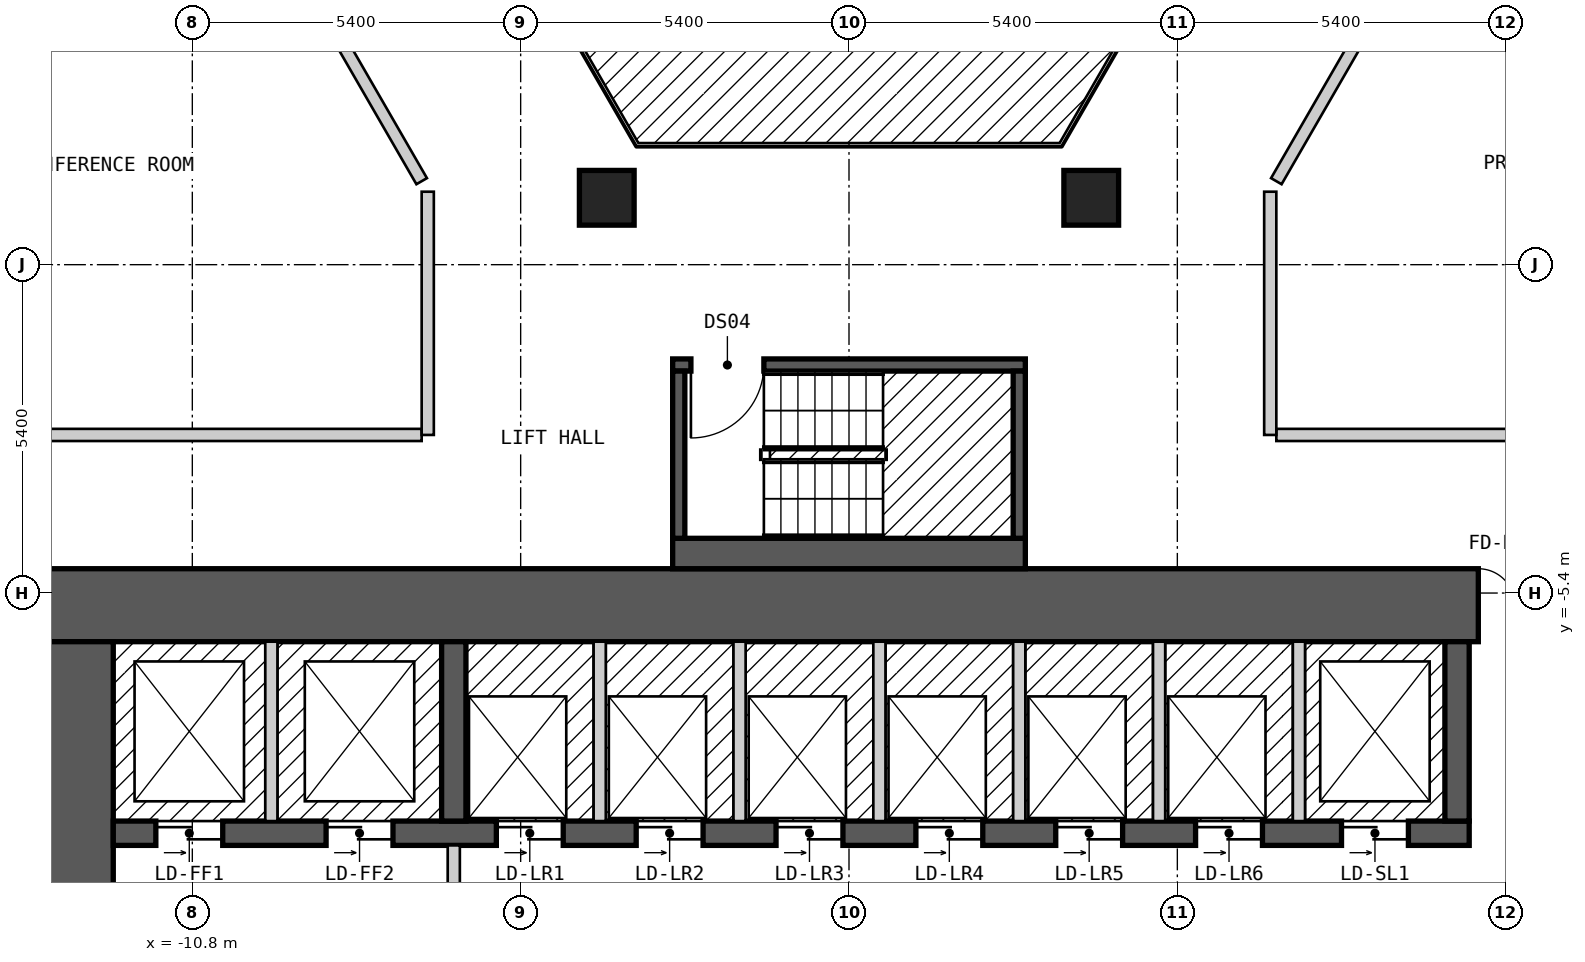
"""IFC4 building model, lengths in metres.
Left out: names, types, materials, properties, quantities, classifications, styles, units other than length and angle.
Written with IfcOpenShell. Run it as: python <this file> out.ifc"""

import sys

from ifc_helpers import new_model, si_unit, direction, frame, frame_2d, origin, origin_2d, place, context, subcontext, project, spatial, rectangle, extrude, element, fill, save


model = new_model("IFC4")
c1 = context("Model", 3, precision=1e-05, world=origin(), true_north=direction((0.0, 1.0)))
c2 = subcontext(c1, "Body", "Model", "MODEL_VIEW")
j1 = project(units=[si_unit("LENGTHUNIT", "METRE"), si_unit("PLANEANGLEUNIT", "RADIAN")], contexts=[c1])
p1 = place(None, origin())
s1 = spatial("IfcSite", under=j1, at=p1, CompositionType="ELEMENT")
p2 = place(p1, origin())
s2 = spatial("IfcBuilding", under=s1, at=p2, CompositionType="ELEMENT")
p3 = place(p2, frame((0.0, 0.0, 50.4)))
s3 = spatial("IfcBuildingStorey", under=s2, at=p3, CompositionType="ELEMENT", Elevation=50.4)
for number, where, z_axis, x_axis in (
    (1, (3.984, 1.1, 0.0), (0.0, 0.0, 1.0), (1.0, 0.0, 0.0)),
    (2, (-3.984, 1.1, 0.0), (0.0, 0.0, 1.0), (1.0, 0.0, 0.0)),
):
    element("IfcColumn", number, at=place(p3, frame(where, z_axis=z_axis, x_axis=x_axis)), inside=s3, PredefinedType="COLUMN", context=c2, shape_type="SweptSolid", body=[
        extrude(rectangle(XDim=0.9, YDim=0.9, at=origin_2d()), origin(), (0.0, 0.0, 1.0), 3.0),
    ])
p4 = place(p3, frame((-13.3, -5.6, 0.0), z_axis=(0.0, 0.0, 1.0), x_axis=(1.0, 0.0, 0.0)))
e3 = element("IfcWall", 3, at=p4, inside=s3, PredefinedType="SHEAR", context=c2, shape_type="SweptSolid", body=[
    extrude(rectangle(XDim=26.6, YDim=1.2, at=frame_2d((13.3, 0.0))), origin(), (0.0, 0.0, 1.0), 2.7),
])
p5 = place(p4, frame((23.65, 0.0, 0.0)))
e4 = element("IfcOpeningElement", 4, at=p5, cuts=e3, PredefinedType="OPENING", context=c2, shape_type="SweptSolid", body=[
    extrude(rectangle(XDim=1.2, YDim=2.1, at=frame_2d((0.6, 1.05))), frame((0.0, 0.61, 0.0), z_axis=(0.0, -1.0, 0.0), x_axis=(1.0, 0.0, 0.0)), (0.0, 0.0, 1.0), 1.22),
])
p6 = place(p3, frame((-12.7, -17.8, 0.0), z_axis=(0.0, 0.0, 1.0), x_axis=(0.0, 1.0, 0.0)))
e5 = element("IfcWall", 5, at=p6, inside=s3, PredefinedType="SHEAR", context=c2, shape_type="SweptSolid", body=[
    extrude(rectangle(XDim=11.6, YDim=1.2, at=frame_2d((5.8, 0.0))), origin(), (0.0, 0.0, 1.0), 2.7),
])
p7 = place(p6, frame((3.6, 0.0, 0.0)))
e6 = element("IfcOpeningElement", 6, at=p7, cuts=e5, PredefinedType="OPENING", context=c2, shape_type="SweptSolid", body=[
    extrude(rectangle(XDim=1.2, YDim=2.1, at=frame_2d((0.6, 1.05))), frame((0.0, 0.61, 0.0), z_axis=(0.0, -1.0, 0.0), x_axis=(1.0, 0.0, 0.0)), (0.0, 0.0, 1.0), 1.22),
])
p8 = place(p3, frame((-12.1, -9.35, 0.0), z_axis=(0.0, 0.0, 1.0), x_axis=(1.0, 0.0, 0.0)))
e7 = element("IfcWall", 7, at=p8, inside=s3, PredefinedType="SHEAR", context=c2, shape_type="SweptSolid", body=[
    extrude(rectangle(XDim=22.3, YDim=0.4, at=frame_2d((11.15, 0.0))), origin(), (0.0, 0.0, 1.0), 2.7),
])
p9 = place(p8, frame((0.7, 0.0, 0.0)))
e8 = element("IfcOpeningElement", 8, at=p9, cuts=e7, PredefinedType="OPENING", context=c2, shape_type="SweptSolid", body=[
    extrude(rectangle(XDim=1.1, YDim=2.1, at=frame_2d((0.55, 1.05))), frame((0.0, 0.21, 0.0), z_axis=(0.0, -1.0, 0.0), x_axis=(1.0, 0.0, 0.0)), (0.0, 0.0, 1.0), 0.42),
])
p10 = place(p8, frame((3.5, 0.0, 0.0)))
e9 = element("IfcOpeningElement", 9, at=p10, cuts=e7, PredefinedType="OPENING", context=c2, shape_type="SweptSolid", body=[
    extrude(rectangle(XDim=1.1, YDim=2.1, at=frame_2d((0.55, 1.05))), frame((0.0, 0.21, 0.0), z_axis=(0.0, -1.0, 0.0), x_axis=(1.0, 0.0, 0.0)), (0.0, 0.0, 1.0), 0.42),
])
p11 = place(p8, frame((6.3, 0.0, 0.0)))
e10 = element("IfcOpeningElement", 10, at=p11, cuts=e7, PredefinedType="OPENING", context=c2, shape_type="SweptSolid", body=[
    extrude(rectangle(XDim=1.1, YDim=2.1, at=frame_2d((0.55, 1.05))), frame((0.0, 0.21, 0.0), z_axis=(0.0, -1.0, 0.0), x_axis=(1.0, 0.0, 0.0)), (0.0, 0.0, 1.0), 0.42),
])
p12 = place(p8, frame((8.6, 0.0, 0.0)))
e11 = element("IfcOpeningElement", 11, at=p12, cuts=e7, PredefinedType="OPENING", context=c2, shape_type="SweptSolid", body=[
    extrude(rectangle(XDim=1.1, YDim=2.1, at=frame_2d((0.55, 1.05))), frame((0.0, 0.21, 0.0), z_axis=(0.0, -1.0, 0.0), x_axis=(1.0, 0.0, 0.0)), (0.0, 0.0, 1.0), 0.42),
])
p13 = place(p8, frame((10.9, 0.0, 0.0)))
e12 = element("IfcOpeningElement", 12, at=p13, cuts=e7, PredefinedType="OPENING", context=c2, shape_type="SweptSolid", body=[
    extrude(rectangle(XDim=1.1, YDim=2.1, at=frame_2d((0.55, 1.05))), frame((0.0, 0.21, 0.0), z_axis=(0.0, -1.0, 0.0), x_axis=(1.0, 0.0, 0.0)), (0.0, 0.0, 1.0), 0.42),
])
p14 = place(p8, frame((13.2, 0.0, 0.0)))
e13 = element("IfcOpeningElement", 13, at=p14, cuts=e7, PredefinedType="OPENING", context=c2, shape_type="SweptSolid", body=[
    extrude(rectangle(XDim=1.1, YDim=2.1, at=frame_2d((0.55, 1.05))), frame((0.0, 0.21, 0.0), z_axis=(0.0, -1.0, 0.0), x_axis=(1.0, 0.0, 0.0)), (0.0, 0.0, 1.0), 0.42),
])
p15 = place(p8, frame((15.5, 0.0, 0.0)))
e14 = element("IfcOpeningElement", 14, at=p15, cuts=e7, PredefinedType="OPENING", context=c2, shape_type="SweptSolid", body=[
    extrude(rectangle(XDim=1.1, YDim=2.1, at=frame_2d((0.55, 1.05))), frame((0.0, 0.21, 0.0), z_axis=(0.0, -1.0, 0.0), x_axis=(1.0, 0.0, 0.0)), (0.0, 0.0, 1.0), 0.42),
])
p16 = place(p8, frame((17.8, 0.0, 0.0)))
e15 = element("IfcOpeningElement", 15, at=p16, cuts=e7, PredefinedType="OPENING", context=c2, shape_type="SweptSolid", body=[
    extrude(rectangle(XDim=1.1, YDim=2.1, at=frame_2d((0.55, 1.05))), frame((0.0, 0.21, 0.0), z_axis=(0.0, -1.0, 0.0), x_axis=(1.0, 0.0, 0.0)), (0.0, 0.0, 1.0), 0.42),
])
p17 = place(p8, frame((20.2, 0.0, 0.0)))
e16 = element("IfcOpeningElement", 16, at=p17, cuts=e7, PredefinedType="OPENING", context=c2, shape_type="SweptSolid", body=[
    extrude(rectangle(XDim=1.1, YDim=2.1, at=frame_2d((0.55, 1.05))), frame((0.0, 0.21, 0.0), z_axis=(0.0, -1.0, 0.0), x_axis=(1.0, 0.0, 0.0)), (0.0, 0.0, 1.0), 0.42),
])
for number, where, z_axis, x_axis in (
    (17, (-6.5, -9.15, 0.0), (0.0, 0.0, 1.0), (0.0, 1.0, 0.0)),
    (18, (10.0, -9.15, 0.0), (0.0, 0.0, 1.0), (0.0, 1.0, 0.0)),
):
    element("IfcWall", number, at=place(p3, frame(where, z_axis=z_axis, x_axis=x_axis)), inside=s3, PredefinedType="SHEAR", context=c2, shape_type="SweptSolid", body=[
        extrude(rectangle(XDim=2.95, YDim=0.4, at=frame_2d((1.475, 0.0))), origin(), (0.0, 0.0, 1.0), 2.7),
    ])
p18 = place(p3, frame((-2.9, -4.75, 0.0), z_axis=(0.0, 0.0, 1.0), x_axis=(1.0, 0.0, 0.0)))
e19 = element("IfcWall", 19, at=p18, inside=s3, PredefinedType="SOLIDWALL", context=c2, shape_type="SweptSolid", body=[
    extrude(rectangle(XDim=5.8, YDim=0.5, at=frame_2d((2.9, 0.0))), origin(), (0.0, 0.0, 1.0), 2.7),
])
p19 = place(p3, frame((-2.9, -1.65, 0.0), z_axis=(0.0, 0.0, 1.0), x_axis=(1.0, 0.0, 0.0)))
e20 = element("IfcWall", 20, at=p19, inside=s3, PredefinedType="SOLIDWALL", context=c2, shape_type="SweptSolid", body=[
    extrude(rectangle(XDim=5.8, YDim=0.2, at=frame_2d((2.9, 0.0))), origin(), (0.0, 0.0, 1.0), 2.7),
])
p20 = place(p19, frame((0.3, 0.0, 0.0)))
e21 = element("IfcOpeningElement", 21, at=p20, cuts=e20, PredefinedType="OPENING", context=c2, shape_type="SweptSolid", body=[
    extrude(rectangle(XDim=1.2, YDim=2.1, at=frame_2d((0.6, 1.05))), frame((0.0, 0.11, 0.0), z_axis=(0.0, -1.0, 0.0), x_axis=(1.0, 0.0, 0.0)), (0.0, 0.0, 1.0), 0.22),
])
for number, where, z_axis, x_axis in (
    (22, (-2.8, -4.5, 0.0), (0.0, 0.0, 1.0), (0.0, 1.0, 0.0)),
    (23, (2.8, -4.5, 0.0), (0.0, 0.0, 1.0), (0.0, 1.0, 0.0)),
):
    element("IfcWall", number, at=place(p3, frame(where, z_axis=z_axis, x_axis=x_axis)), inside=s3, PredefinedType="SOLIDWALL", context=c2, shape_type="SweptSolid", body=[
        extrude(rectangle(XDim=2.75, YDim=0.2, at=frame_2d((1.375, 0.0))), origin(), (0.0, 0.0, 1.0), 2.7),
    ])
p21 = place(p3, frame((-10.796, 7.9, 0.0), z_axis=(0.0, 0.0, 1.0), x_axis=(0.499954271211, -0.866051803703, 0.0)))
e24 = element("IfcWall", 24, at=p21, inside=s3, PredefinedType="PARTITIONING", context=c2, shape_type="SweptSolid", body=[
    extrude(rectangle(XDim=7.536, YDim=0.2, at=frame_2d((3.768, 0.0))), origin(), (0.0, 0.0, 1.0), 2.7),
])
p22 = place(p3, frame((9.18, 15.7, 0.0), z_axis=(0.0, 0.0, 1.0), x_axis=(0.500003652032, -0.866023295272, 0.0)))
e25 = element("IfcWall", 25, at=p22, inside=s3, PredefinedType="PARTITIONING", context=c2, shape_type="SweptSolid", body=[
    extrude(rectangle(XDim=18.012, YDim=0.2, at=frame_2d((9.006, 0.0))), origin(), (0.0, 0.0, 1.0), 2.7),
])
p23 = place(p22, frame((8.556, 0.0, 0.0)))
e26 = element("IfcOpeningElement", 26, at=p23, cuts=e25, PredefinedType="OPENING", context=c2, shape_type="SweptSolid", body=[
    extrude(rectangle(XDim=0.9, YDim=2.1, at=frame_2d((0.45, 1.05))), frame((0.0, 0.11, 0.0), z_axis=(0.0, -1.0, 0.0), x_axis=(1.0, 0.0, 0.0)), (0.0, 0.0, 1.0), 0.22),
])
p24 = place(p3, frame((10.45, 17.9, 0.0), z_axis=(0.0, 0.0, 1.0), x_axis=(0.500034352617, -0.866005569383, 0.0)))
e27 = element("IfcWall", 27, at=p24, inside=s3, PredefinedType="PARTITIONING", context=c2, shape_type="SweptSolid", body=[
    extrude(rectangle(XDim=20.553, YDim=0.2, at=frame_2d((10.276, 0.0))), origin(), (0.0, 0.0, 1.0), 2.7),
])
p25 = place(p24, frame((14.902, 0.0, 0.0)))
e28 = element("IfcOpeningElement", 28, at=p25, cuts=e27, PredefinedType="OPENING", context=c2, shape_type="SweptSolid", body=[
    extrude(rectangle(XDim=1.0, YDim=2.1, at=frame_2d((0.5, 1.05))), frame((0.0, 0.11, 0.0), z_axis=(0.0, -1.0, 0.0), x_axis=(1.0, 0.0, 0.0)), (0.0, 0.0, 1.0), 0.22),
])
p26 = place(p24, frame((4.671, 0.0, 0.0)))
e29 = element("IfcOpeningElement", 29, at=p26, cuts=e27, PredefinedType="OPENING", context=c2, shape_type="SweptSolid", body=[
    extrude(rectangle(XDim=1.0, YDim=2.1, at=frame_2d((0.5, 1.05))), frame((0.0, 0.11, 0.0), z_axis=(0.0, -1.0, 0.0), x_axis=(1.0, 0.0, 0.0)), (0.0, 0.0, 1.0), 0.22),
])
for number, where, z_axis, x_axis in (
    (30, (-15.4, -2.8, 0.0), (0.0, 0.0, 1.0), (1.0, 0.0, 0.0)),
    (31, (7.028, -2.8, 0.0), (0.0, 0.0, 1.0), (1.0, 0.0, 0.0)),
):
    element("IfcWall", number, at=place(p3, frame(where, z_axis=z_axis, x_axis=x_axis)), inside=s3, PredefinedType="PARTITIONING", context=c2, shape_type="SweptSolid", body=[
        extrude(rectangle(XDim=8.372, YDim=0.2, at=frame_2d((4.186, 0.0))), origin(), (0.0, 0.0, 1.0), 2.7),
    ])
p27 = place(p3, frame((7.028, 1.373, 0.0), z_axis=(0.0, 0.0, 1.0), x_axis=(0.49998574534, 0.86603363356, 0.0)))
e32 = element("IfcWall", 32, at=p27, inside=s3, PredefinedType="PARTITIONING", context=c2, shape_type="SweptSolid", body=[
    extrude(rectangle(XDim=7.652, YDim=0.2, at=frame_2d((3.826, 0.0))), origin(), (0.0, 0.0, 1.0), 2.7),
])
p28 = place(p3, frame((-18.244, -0.001, 0.0), z_axis=(0.0, 0.0, 1.0), x_axis=(0.499962999376, 0.866046765051, 0.0)))
e33 = element("IfcWall", 33, at=p28, inside=s3, PredefinedType="PARTITIONING", context=c2, shape_type="SweptSolid", body=[
    extrude(rectangle(XDim=18.245, YDim=0.2, at=frame_2d((9.123, 0.0))), origin(), (0.0, 0.0, 1.0), 2.7),
])
p29 = place(p28, frame((8.672, 0.0, 0.0)))
e34 = element("IfcOpeningElement", 34, at=p29, cuts=e33, PredefinedType="OPENING", context=c2, shape_type="SweptSolid", body=[
    extrude(rectangle(XDim=0.9, YDim=2.1, at=frame_2d((0.45, 1.05))), frame((0.0, 0.11, 0.0), z_axis=(0.0, -1.0, 0.0), x_axis=(1.0, 0.0, 0.0)), (0.0, 0.0, 1.0), 0.22),
])
p30 = place(p3, frame((-20.727, 0.099, 0.0), z_axis=(0.0, 0.0, 1.0), x_axis=(0.499993204491, 0.866029327138, 0.0)))
e35 = element("IfcWall", 35, at=p30, inside=s3, PredefinedType="PARTITIONING", context=c2, shape_type="SweptSolid", body=[
    extrude(rectangle(XDim=20.554, YDim=0.2, at=frame_2d((10.277, 0.0))), origin(), (0.0, 0.0, 1.0), 2.7),
])
p31 = place(p30, frame((9.776, 0.0, 0.0)))
e36 = element("IfcOpeningElement", 36, at=p31, cuts=e35, PredefinedType="OPENING", context=c2, shape_type="SweptSolid", body=[
    extrude(rectangle(XDim=1.0, YDim=2.1, at=frame_2d((0.5, 1.05))), frame((0.0, 0.11, 0.0), z_axis=(0.0, -1.0, 0.0), x_axis=(1.0, 0.0, 0.0)), (0.0, 0.0, 1.0), 0.22),
])
p32 = place(p30, frame((4.673, 0.0, 0.0)))
e37 = element("IfcOpeningElement", 37, at=p32, cuts=e35, PredefinedType="OPENING", context=c2, shape_type="SweptSolid", body=[
    extrude(rectangle(XDim=1.0, YDim=2.1, at=frame_2d((0.5, 1.05))), frame((0.0, 0.11, 0.0), z_axis=(0.0, -1.0, 0.0), x_axis=(1.0, 0.0, 0.0)), (0.0, 0.0, 1.0), 0.22),
])
p33 = place(p30, frame((14.88, 0.0, 0.0)))
e38 = element("IfcOpeningElement", 38, at=p33, cuts=e35, PredefinedType="OPENING", context=c2, shape_type="SweptSolid", body=[
    extrude(rectangle(XDim=1.0, YDim=2.1, at=frame_2d((0.5, 1.05))), frame((0.0, 0.11, 0.0), z_axis=(0.0, -1.0, 0.0), x_axis=(1.0, 0.0, 0.0)), (0.0, 0.0, 1.0), 0.22),
])
for number, where, z_axis, x_axis in (
    (39, (6.928, -2.8, 0.0), (0.0, 0.0, 1.0), (0.0, 1.0, 0.0)),
    (40, (-6.928, -2.8, 0.0), (0.0, 0.0, 1.0), (0.0, 1.0, 0.0)),
):
    element("IfcWall", number, at=place(p3, frame(where, z_axis=z_axis, x_axis=x_axis)), inside=s3, PredefinedType="PARTITIONING", context=c2, shape_type="SweptSolid", body=[
        extrude(rectangle(XDim=4.0, YDim=0.2, at=frame_2d((2.0, 0.0))), origin(), (0.0, 0.0, 1.0), 2.7),
    ])
p34 = place(p3, frame((-9.5, -9.15, 0.0), z_axis=(0.0, 0.0, 1.0), x_axis=(0.0, 1.0, 0.0)))
e41 = element("IfcWall", 41, at=p34, inside=s3, PredefinedType="SOLIDWALL", context=c2, shape_type="SweptSolid", body=[
    extrude(rectangle(XDim=2.95, YDim=0.2, at=frame_2d((1.475, 0.0))), origin(), (0.0, 0.0, 1.0), 2.7),
])
p35 = place(p3, frame((-6.5, -14.45, 0.0), z_axis=(0.0, 0.0, 1.0), x_axis=(0.0, 1.0, 0.0)))
e42 = element("IfcWall", 42, at=p35, inside=s3, PredefinedType="PARTITIONING", context=c2, shape_type="SweptSolid", body=[
    extrude(rectangle(XDim=4.9, YDim=0.2, at=frame_2d((2.45, 0.0))), origin(), (0.0, 0.0, 1.0), 2.7),
])
p36 = place(p35, frame((3.15, 0.0, 0.0), z_axis=(0.0, 0.0, 1.0), x_axis=(-1.0, 0.0, 0.0)))
e43 = element("IfcOpeningElement", 43, at=p36, cuts=e42, PredefinedType="OPENING", context=c2, shape_type="SweptSolid", body=[
    extrude(rectangle(XDim=1.4, YDim=2.1, at=frame_2d((0.7, 1.05))), frame((0.0, 0.11, 0.0), z_axis=(0.0, -1.0, 0.0), x_axis=(1.0, 0.0, 0.0)), (0.0, 0.0, 1.0), 0.22),
])
for number, where, z_axis, x_axis in (
    (44, (-4.1, -9.15, 0.0), (0.0, 0.0, 1.0), (0.0, 1.0, 0.0)),
    (45, (-1.8, -9.15, 0.0), (0.0, 0.0, 1.0), (0.0, 1.0, 0.0)),
    (46, (0.5, -9.15, 0.0), (0.0, 0.0, 1.0), (0.0, 1.0, 0.0)),
    (47, (2.8, -9.15, 0.0), (0.0, 0.0, 1.0), (0.0, 1.0, 0.0)),
    (48, (5.1, -9.15, 0.0), (0.0, 0.0, 1.0), (0.0, 1.0, 0.0)),
    (49, (7.4, -9.15, 0.0), (0.0, 0.0, 1.0), (0.0, 1.0, 0.0)),
):
    element("IfcWall", number, at=place(p3, frame(where, z_axis=z_axis, x_axis=x_axis)), inside=s3, PredefinedType="SOLIDWALL", context=c2, shape_type="SweptSolid", body=[
        extrude(rectangle(XDim=2.95, YDim=0.2, at=frame_2d((1.475, 0.0))), origin(), (0.0, 0.0, 1.0), 2.7),
    ])
p37 = place(p20, origin())
e50 = element("IfcDoor", 50, at=p37, inside=s3, OperationType="SINGLE_SWING_LEFT", PredefinedType="DOOR", context=c2, shape_type="SweptSolid", body=[
    extrude(rectangle(XDim=1.2, YDim=2.1, at=frame_2d((0.6, 1.05))), frame((0.0, 0.025, 0.0), z_axis=(0.0, -1.0, 0.0), x_axis=(1.0, 0.0, 0.0)), (0.0, 0.0, 1.0), 0.05),
])
fill(e21, e50)
p38 = place(p9, origin())
e51 = element("IfcDoor", 51, at=p38, inside=s3, OperationType="DOUBLE_DOOR_SLIDING", PredefinedType="DOOR", context=c2, shape_type="SweptSolid", body=[
    extrude(rectangle(XDim=1.1, YDim=2.1, at=frame_2d((0.55, 1.05))), frame((0.0, 0.025, 0.0), z_axis=(0.0, -1.0, 0.0), x_axis=(1.0, 0.0, 0.0)), (0.0, 0.0, 1.0), 0.05),
])
fill(e8, e51)
p39 = place(p10, origin())
e52 = element("IfcDoor", 52, at=p39, inside=s3, OperationType="DOUBLE_DOOR_SLIDING", PredefinedType="DOOR", context=c2, shape_type="SweptSolid", body=[
    extrude(rectangle(XDim=1.1, YDim=2.1, at=frame_2d((0.55, 1.05))), frame((0.0, 0.025, 0.0), z_axis=(0.0, -1.0, 0.0), x_axis=(1.0, 0.0, 0.0)), (0.0, 0.0, 1.0), 0.05),
])
fill(e9, e52)
p40 = place(p11, origin())
e53 = element("IfcDoor", 53, at=p40, inside=s3, OperationType="DOUBLE_DOOR_SLIDING", PredefinedType="DOOR", context=c2, shape_type="SweptSolid", body=[
    extrude(rectangle(XDim=1.1, YDim=2.1, at=frame_2d((0.55, 1.05))), frame((0.0, 0.025, 0.0), z_axis=(0.0, -1.0, 0.0), x_axis=(1.0, 0.0, 0.0)), (0.0, 0.0, 1.0), 0.05),
])
fill(e10, e53)
p41 = place(p12, origin())
e54 = element("IfcDoor", 54, at=p41, inside=s3, OperationType="DOUBLE_DOOR_SLIDING", PredefinedType="DOOR", context=c2, shape_type="SweptSolid", body=[
    extrude(rectangle(XDim=1.1, YDim=2.1, at=frame_2d((0.55, 1.05))), frame((0.0, 0.025, 0.0), z_axis=(0.0, -1.0, 0.0), x_axis=(1.0, 0.0, 0.0)), (0.0, 0.0, 1.0), 0.05),
])
fill(e11, e54)
p42 = place(p13, origin())
e55 = element("IfcDoor", 55, at=p42, inside=s3, OperationType="DOUBLE_DOOR_SLIDING", PredefinedType="DOOR", context=c2, shape_type="SweptSolid", body=[
    extrude(rectangle(XDim=1.1, YDim=2.1, at=frame_2d((0.55, 1.05))), frame((0.0, 0.025, 0.0), z_axis=(0.0, -1.0, 0.0), x_axis=(1.0, 0.0, 0.0)), (0.0, 0.0, 1.0), 0.05),
])
fill(e12, e55)
p43 = place(p14, origin())
e56 = element("IfcDoor", 56, at=p43, inside=s3, OperationType="DOUBLE_DOOR_SLIDING", PredefinedType="DOOR", context=c2, shape_type="SweptSolid", body=[
    extrude(rectangle(XDim=1.1, YDim=2.1, at=frame_2d((0.55, 1.05))), frame((0.0, 0.025, 0.0), z_axis=(0.0, -1.0, 0.0), x_axis=(1.0, 0.0, 0.0)), (0.0, 0.0, 1.0), 0.05),
])
fill(e13, e56)
p44 = place(p15, origin())
e57 = element("IfcDoor", 57, at=p44, inside=s3, OperationType="DOUBLE_DOOR_SLIDING", PredefinedType="DOOR", context=c2, shape_type="SweptSolid", body=[
    extrude(rectangle(XDim=1.1, YDim=2.1, at=frame_2d((0.55, 1.05))), frame((0.0, 0.025, 0.0), z_axis=(0.0, -1.0, 0.0), x_axis=(1.0, 0.0, 0.0)), (0.0, 0.0, 1.0), 0.05),
])
fill(e14, e57)
p45 = place(p16, origin())
e58 = element("IfcDoor", 58, at=p45, inside=s3, OperationType="DOUBLE_DOOR_SLIDING", PredefinedType="DOOR", context=c2, shape_type="SweptSolid", body=[
    extrude(rectangle(XDim=1.1, YDim=2.1, at=frame_2d((0.55, 1.05))), frame((0.0, 0.025, 0.0), z_axis=(0.0, -1.0, 0.0), x_axis=(1.0, 0.0, 0.0)), (0.0, 0.0, 1.0), 0.05),
])
fill(e15, e58)
p46 = place(p17, origin())
e59 = element("IfcDoor", 59, at=p46, inside=s3, OperationType="DOUBLE_DOOR_SLIDING", PredefinedType="DOOR", context=c2, shape_type="SweptSolid", body=[
    extrude(rectangle(XDim=1.1, YDim=2.1, at=frame_2d((0.55, 1.05))), frame((0.0, 0.025, 0.0), z_axis=(0.0, -1.0, 0.0), x_axis=(1.0, 0.0, 0.0)), (0.0, 0.0, 1.0), 0.05),
])
fill(e16, e59)
p47 = place(p5, origin())
e60 = element("IfcDoor", 60, at=p47, inside=s3, OperationType="DOUBLE_DOOR_SINGLE_SWING", PredefinedType="DOOR", context=c2, shape_type="SweptSolid", body=[
    extrude(rectangle(XDim=1.2, YDim=2.1, at=frame_2d((0.6, 1.05))), frame((0.0, 0.025, 0.0), z_axis=(0.0, -1.0, 0.0), x_axis=(1.0, 0.0, 0.0)), (0.0, 0.0, 1.0), 0.05),
])
fill(e4, e60)
save(model, sys.argv[1])
